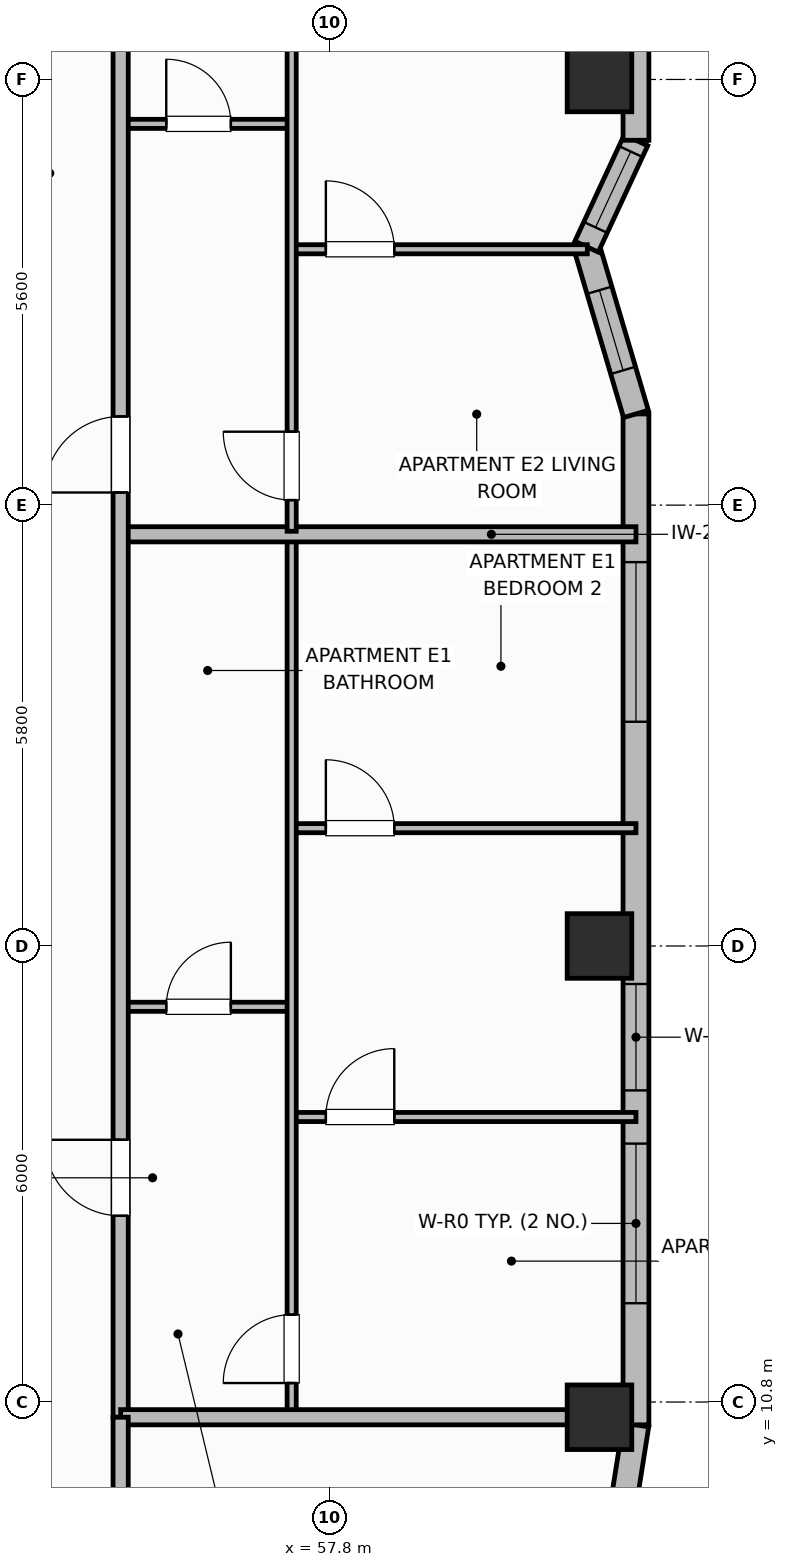
"""IFC4 building model, lengths in metres.
Left out: names, types, materials, properties, quantities, classifications, styles, units other than length and angle.
Written with IfcOpenShell. Run it as: python <this file> out.ifc"""

import sys

from ifc_helpers import new_model, si_unit, direction, frame, frame_2d, origin, origin_2d, place, context, subcontext, project, spatial, rectangle, extrude, element, fill, save


model = new_model("IFC4")
c1 = context("Model", 3, precision=1e-05, world=origin(), true_north=direction((0.0, 1.0)))
c2 = subcontext(c1, "Body", "Model", "MODEL_VIEW")
j1 = project(units=[si_unit("LENGTHUNIT", "METRE"), si_unit("PLANEANGLEUNIT", "RADIAN")], contexts=[c1])
p1 = place(None, origin())
s1 = spatial("IfcSite", under=j1, at=p1, CompositionType="ELEMENT")
p2 = place(p1, origin())
s2 = spatial("IfcBuilding", under=s1, at=p2, CompositionType="ELEMENT")
p3 = place(p2, frame((0.0, 0.0, 214.7)))
s3 = spatial("IfcBuildingStorey", under=s2, at=p3, CompositionType="ELEMENT", Elevation=214.7)
for number, where, z_axis, x_axis in (
    (1, (61.35, 10.6, 0.0), (0.0, 0.0, 1.0), (1.0, 0.0, 0.0)),
    (2, (61.35, 16.8, 0.0), (0.0, 0.0, 1.0), (1.0, 0.0, 0.0)),
    (3, (61.35, 28.2, 0.0), (0.0, 0.0, 1.0), (1.0, 0.0, 0.0)),
):
    element("IfcColumn", number, at=place(p3, frame(where, z_axis=z_axis, x_axis=x_axis)), inside=s3, PredefinedType="COLUMN", context=c2, shape_type="SweptSolid", body=[
        extrude(rectangle(XDim=0.85, YDim=0.85, at=origin_2d()), origin(), (0.0, 0.0, 1.0), 3.7),
    ])
p4 = place(p3, frame((61.652, 9.378, 0.0), z_axis=(0.0, 0.0, 1.0), x_axis=(0.156514556949, 0.987675651954, 0.0)))
e4 = element("IfcWall", 4, at=p4, inside=s3, PredefinedType="SOLIDWALL", context=c2, shape_type="SweptSolid", body=[
    extrude(rectangle(XDim=1.135, YDim=0.34, at=frame_2d((0.568, 0.0))), origin(), (0.0, 0.0, 1.0), 2.72),
])
p5 = place(p3, frame((61.83, 10.5, 0.0), z_axis=(0.0, 0.0, 1.0), x_axis=(0.0, 1.0, 0.0)))
e5 = element("IfcWall", 5, at=p5, inside=s3, PredefinedType="SOLIDWALL", context=c2, shape_type="SweptSolid", body=[
    extrude(rectangle(XDim=13.3, YDim=0.34, at=frame_2d((6.65, 0.0))), origin(), (0.0, 0.0, 1.0), 2.72),
])
p6 = place(p5, frame((1.6, 0.0, 0.7)))
e6 = element("IfcOpeningElement", 6, at=p6, cuts=e5, PredefinedType="OPENING", context=c2, shape_type="SweptSolid", body=[
    extrude(rectangle(XDim=2.1, YDim=1.9, at=frame_2d((1.05, 0.95))), frame((0.0, 0.18, 0.0), z_axis=(0.0, -1.0, 0.0), x_axis=(1.0, 0.0, 0.0)), (0.0, 0.0, 1.0), 0.36),
])
p7 = place(p5, frame((4.4, 0.0, 0.71)))
e7 = element("IfcOpeningElement", 7, at=p7, cuts=e5, PredefinedType="OPENING", context=c2, shape_type="SweptSolid", body=[
    extrude(rectangle(XDim=1.4, YDim=1.85, at=frame_2d((0.7, 0.925))), frame((0.0, 0.18, 0.0), z_axis=(0.0, -1.0, 0.0), x_axis=(1.0, 0.0, 0.0)), (0.0, 0.0, 1.0), 0.36),
])
p8 = place(p5, frame((9.25, 0.0, 0.7)))
e8 = element("IfcOpeningElement", 8, at=p8, cuts=e5, PredefinedType="OPENING", context=c2, shape_type="SweptSolid", body=[
    extrude(rectangle(XDim=2.1, YDim=1.9, at=frame_2d((1.05, 0.95))), frame((0.0, 0.18, 0.0), z_axis=(0.0, -1.0, 0.0), x_axis=(1.0, 0.0, 0.0)), (0.0, 0.0, 1.0), 0.36),
])
p9 = place(p3, frame((61.83, 23.8, 0.0), z_axis=(0.0, 0.0, 1.0), x_axis=(-0.283410652833, 0.958998645391, 0.0)))
e9 = element("IfcWall", 9, at=p9, inside=s3, PredefinedType="SOLIDWALL", context=c2, shape_type="SweptSolid", body=[
    extrude(rectangle(XDim=2.294, YDim=0.34, at=frame_2d((1.147, 0.0))), origin(), (0.0, 0.0, 1.0), 2.72),
])
p10 = place(p9, frame((0.597, 0.0, 0.91)))
e10 = element("IfcOpeningElement", 10, at=p10, cuts=e9, PredefinedType="OPENING", context=c2, shape_type="SweptSolid", body=[
    extrude(rectangle(XDim=1.1, YDim=1.65, at=frame_2d((0.55, 0.825))), frame((0.0, 0.18, 0.0), z_axis=(0.0, -1.0, 0.0), x_axis=(1.0, 0.0, 0.0)), (0.0, 0.0, 1.0), 0.36),
])
p11 = place(p3, frame((61.18, 26.0, 0.0), z_axis=(0.0, 0.0, 1.0), x_axis=(0.421213543339, 0.906961493619, 0.0)))
e11 = element("IfcWall", 11, at=p11, inside=s3, PredefinedType="SOLIDWALL", context=c2, shape_type="SweptSolid", body=[
    extrude(rectangle(XDim=1.543, YDim=0.34, at=frame_2d((0.772, 0.0))), origin(), (0.0, 0.0, 1.0), 2.72),
])
p12 = place(p11, frame((0.28, 0.0, 0.91)))
e12 = element("IfcOpeningElement", 12, at=p12, cuts=e11, PredefinedType="OPENING", context=c2, shape_type="SweptSolid", body=[
    extrude(rectangle(XDim=1.1, YDim=1.65, at=frame_2d((0.55, 0.825))), frame((0.0, 0.18, 0.0), z_axis=(0.0, -1.0, 0.0), x_axis=(1.0, 0.0, 0.0)), (0.0, 0.0, 1.0), 0.36),
])
p13 = place(p3, frame((61.83, 27.4, 0.0), z_axis=(0.0, 0.0, 1.0), x_axis=(0.0, 1.0, 0.0)))
e13 = element("IfcWall", 13, at=p13, inside=s3, PredefinedType="SOLIDWALL", context=c2, shape_type="SweptSolid", body=[
    extrude(rectangle(XDim=1.6, YDim=0.34, at=frame_2d((0.8, 0.0))), origin(), (0.0, 0.0, 1.0), 2.72),
])
p14 = place(p3, frame((55.05, 16.0, 0.0), z_axis=(0.0, 0.0, 1.0), x_axis=(1.0, 0.0, 0.0)))
e14 = element("IfcWall", 14, at=p14, inside=s3, PredefinedType="PARTITIONING", context=c2, shape_type="SweptSolid", body=[
    extrude(rectangle(XDim=2.25, YDim=0.12, at=frame_2d((1.125, 0.0))), origin(), (0.0, 0.0, 1.0), 2.55),
])
p15 = place(p14, frame((0.6, 0.0, 0.0)))
e15 = element("IfcOpeningElement", 15, at=p15, cuts=e14, PredefinedType="OPENING", context=c2, shape_type="SweptSolid", body=[
    extrude(rectangle(XDim=0.85, YDim=2.1, at=frame_2d((0.425, 1.05))), frame((0.0, 0.07, 0.0), z_axis=(0.0, -1.0, 0.0), x_axis=(1.0, 0.0, 0.0)), (0.0, 0.0, 1.0), 0.14),
])
p16 = place(p3, frame((57.3, 14.55, 0.0), z_axis=(0.0, 0.0, 1.0), x_axis=(1.0, 0.0, 0.0)))
e16 = element("IfcWall", 16, at=p16, inside=s3, PredefinedType="PARTITIONING", context=c2, shape_type="SweptSolid", body=[
    extrude(rectangle(XDim=4.53, YDim=0.12, at=frame_2d((2.265, 0.0))), origin(), (0.0, 0.0, 1.0), 2.55),
])
p17 = place(p16, frame((0.45, 0.0, 0.0)))
e17 = element("IfcOpeningElement", 17, at=p17, cuts=e16, PredefinedType="OPENING", context=c2, shape_type="SweptSolid", body=[
    extrude(rectangle(XDim=0.9, YDim=2.1, at=frame_2d((0.45, 1.05))), frame((0.0, 0.07, 0.0), z_axis=(0.0, -1.0, 0.0), x_axis=(1.0, 0.0, 0.0)), (0.0, 0.0, 1.0), 0.14),
])
p18 = place(p3, frame((57.3, 18.35, 0.0), z_axis=(0.0, 0.0, 1.0), x_axis=(1.0, 0.0, 0.0)))
e18 = element("IfcWall", 18, at=p18, inside=s3, PredefinedType="PARTITIONING", context=c2, shape_type="SweptSolid", body=[
    extrude(rectangle(XDim=4.53, YDim=0.12, at=frame_2d((2.265, 0.0))), origin(), (0.0, 0.0, 1.0), 2.55),
])
p19 = place(p18, frame((0.45, 0.0, 0.0)))
e19 = element("IfcOpeningElement", 19, at=p19, cuts=e18, PredefinedType="OPENING", context=c2, shape_type="SweptSolid", body=[
    extrude(rectangle(XDim=0.9, YDim=2.1, at=frame_2d((0.45, 1.05))), frame((0.0, 0.07, 0.0), z_axis=(0.0, -1.0, 0.0), x_axis=(1.0, 0.0, 0.0)), (0.0, 0.0, 1.0), 0.14),
])
p20 = place(p3, frame((57.3, 10.64, 0.0), z_axis=(0.0, 0.0, 1.0), x_axis=(0.0, 1.0, 0.0)))
e20 = element("IfcWall", 20, at=p20, inside=s3, PredefinedType="PARTITIONING", context=c2, shape_type="SweptSolid", body=[
    extrude(rectangle(XDim=11.536, YDim=0.12, at=frame_2d((5.768, 0.0))), origin(), (0.0, 0.0, 1.0), 2.55),
])
p21 = place(p20, frame((0.41, 0.0, 0.0)))
e21 = element("IfcOpeningElement", 21, at=p21, cuts=e20, PredefinedType="OPENING", context=c2, shape_type="SweptSolid", body=[
    extrude(rectangle(XDim=0.9, YDim=2.1, at=frame_2d((0.45, 1.05))), frame((0.0, 0.07, 0.0), z_axis=(0.0, -1.0, 0.0), x_axis=(1.0, 0.0, 0.0)), (0.0, 0.0, 1.0), 0.14),
])
p22 = place(p3, frame((55.05, 22.216, 0.0), z_axis=(0.0, 0.0, 1.0), x_axis=(1.0, 0.0, 0.0)))
e22 = element("IfcWall", 22, at=p22, inside=s3, PredefinedType="PARTITIONING", context=c2, shape_type="SweptSolid", body=[
    extrude(rectangle(XDim=6.78, YDim=0.2, at=frame_2d((3.39, 0.0))), origin(), (0.0, 0.0, 1.0), 2.55),
])
p23 = place(p3, frame((55.05, 27.616, 0.0), z_axis=(0.0, 0.0, 1.0), x_axis=(1.0, 0.0, 0.0)))
e23 = element("IfcWall", 23, at=p23, inside=s3, PredefinedType="PARTITIONING", context=c2, shape_type="SweptSolid", body=[
    extrude(rectangle(XDim=2.25, YDim=0.12, at=frame_2d((1.125, 0.0))), origin(), (0.0, 0.0, 1.0), 2.55),
])
p24 = place(p23, frame((0.6, 0.0, 0.0)))
e24 = element("IfcOpeningElement", 24, at=p24, cuts=e23, PredefinedType="OPENING", context=c2, shape_type="SweptSolid", body=[
    extrude(rectangle(XDim=0.85, YDim=2.1, at=frame_2d((0.425, 1.05))), frame((0.0, 0.07, 0.0), z_axis=(0.0, -1.0, 0.0), x_axis=(1.0, 0.0, 0.0)), (0.0, 0.0, 1.0), 0.14),
])
p25 = place(p3, frame((57.3, 25.966, 0.0), z_axis=(0.0, 0.0, 1.0), x_axis=(1.0, 0.0, 0.0)))
e25 = element("IfcWall", 25, at=p25, inside=s3, PredefinedType="PARTITIONING", context=c2, shape_type="SweptSolid", body=[
    extrude(rectangle(XDim=3.89, YDim=0.12, at=frame_2d((1.945, 0.0))), origin(), (0.0, 0.0, 1.0), 2.55),
])
p26 = place(p25, frame((0.45, 0.0, 0.0)))
e26 = element("IfcOpeningElement", 26, at=p26, cuts=e25, PredefinedType="OPENING", context=c2, shape_type="SweptSolid", body=[
    extrude(rectangle(XDim=0.9, YDim=2.1, at=frame_2d((0.45, 1.05))), frame((0.0, 0.07, 0.0), z_axis=(0.0, -1.0, 0.0), x_axis=(1.0, 0.0, 0.0)), (0.0, 0.0, 1.0), 0.14),
])
p27 = place(p3, frame((57.3, 22.256, 0.0), z_axis=(0.0, 0.0, 1.0), x_axis=(0.0, 1.0, 0.0)))
e27 = element("IfcWall", 27, at=p27, inside=s3, PredefinedType="PARTITIONING", context=c2, shape_type="SweptSolid", body=[
    extrude(rectangle(XDim=11.404, YDim=0.12, at=frame_2d((5.702, 0.0))), origin(), (0.0, 0.0, 1.0), 2.55),
])
p28 = place(p27, frame((0.41, 0.0, 0.0)))
e28 = element("IfcOpeningElement", 28, at=p28, cuts=e27, PredefinedType="OPENING", context=c2, shape_type="SweptSolid", body=[
    extrude(rectangle(XDim=0.9, YDim=2.1, at=frame_2d((0.45, 1.05))), frame((0.0, 0.07, 0.0), z_axis=(0.0, -1.0, 0.0), x_axis=(1.0, 0.0, 0.0)), (0.0, 0.0, 1.0), 0.14),
])
p29 = place(p3, frame((55.05, 10.6, 0.0), z_axis=(0.0, 0.0, 1.0), x_axis=(0.0, 1.0, 0.0)))
e29 = element("IfcWall", 29, at=p29, inside=s3, PredefinedType="PARTITIONING", context=c2, shape_type="SweptSolid", body=[
    extrude(rectangle(XDim=35.2, YDim=0.2, at=frame_2d((17.6, 0.0))), origin(), (0.0, 0.0, 1.0), 2.55),
])
p30 = place(p29, frame((2.65, 0.0, 0.0)))
e30 = element("IfcOpeningElement", 30, at=p30, cuts=e29, PredefinedType="OPENING", context=c2, shape_type="SweptSolid", body=[
    extrude(rectangle(XDim=1.0, YDim=2.15, at=frame_2d((0.5, 1.075))), frame((0.0, 0.11, 0.0), z_axis=(0.0, -1.0, 0.0), x_axis=(1.0, 0.0, 0.0)), (0.0, 0.0, 1.0), 0.22),
])
p31 = place(p29, frame((12.166, 0.0, 0.0)))
e31 = element("IfcOpeningElement", 31, at=p31, cuts=e29, PredefinedType="OPENING", context=c2, shape_type="SweptSolid", body=[
    extrude(rectangle(XDim=1.0, YDim=2.15, at=frame_2d((0.5, 1.075))), frame((0.0, 0.11, 0.0), z_axis=(0.0, -1.0, 0.0), x_axis=(1.0, 0.0, 0.0)), (0.0, 0.0, 1.0), 0.22),
])
p32 = place(p29, frame((23.65, 0.0, 0.0)))
e32 = element("IfcOpeningElement", 32, at=p32, cuts=e29, PredefinedType="OPENING", context=c2, shape_type="SweptSolid", body=[
    extrude(rectangle(XDim=1.0, YDim=2.15, at=frame_2d((0.5, 1.075))), frame((0.0, 0.11, 0.0), z_axis=(0.0, -1.0, 0.0), x_axis=(1.0, 0.0, 0.0)), (0.0, 0.0, 1.0), 0.22),
])
p33 = place(p3, frame((55.05, 10.6, 0.0), z_axis=(0.0, 0.0, 1.0), x_axis=(1.0, 0.0, 0.0)))
e33 = element("IfcWall", 33, at=p33, inside=s3, PredefinedType="PARTITIONING", context=c2, shape_type="SweptSolid", body=[
    extrude(rectangle(XDim=6.36, YDim=0.2, at=frame_2d((3.18, 0.0))), origin(), (0.0, 0.0, 1.0), 2.55),
])
p34 = place(p3, frame((55.05, 6.87, 0.0), z_axis=(0.0, 0.0, 1.0), x_axis=(0.0, 1.0, 0.0)))
e34 = element("IfcWall", 34, at=p34, inside=s3, PredefinedType="PARTITIONING", context=c2, shape_type="SweptSolid", body=[
    extrude(rectangle(XDim=3.73, YDim=0.2, at=frame_2d((1.865, 0.0))), origin(), (0.0, 0.0, 1.0), 2.55),
])
p35 = place(p6, origin())
e35 = element("IfcWindow", 35, at=p35, inside=s3, PartitioningType="SINGLE_PANEL", PredefinedType="WINDOW", context=c2, shape_type="SweptSolid", body=[
    extrude(rectangle(XDim=2.1, YDim=1.9, at=frame_2d((1.05, 0.95))), frame((0.0, 0.03, 0.0), z_axis=(0.0, -1.0, 0.0), x_axis=(1.0, 0.0, 0.0)), (0.0, 0.0, 1.0), 0.06),
])
fill(e6, e35)
p36 = place(p7, origin())
e36 = element("IfcWindow", 36, at=p36, inside=s3, PartitioningType="SINGLE_PANEL", PredefinedType="WINDOW", context=c2, shape_type="SweptSolid", body=[
    extrude(rectangle(XDim=1.4, YDim=1.85, at=frame_2d((0.7, 0.925))), frame((0.0, 0.03, 0.0), z_axis=(0.0, -1.0, 0.0), x_axis=(1.0, 0.0, 0.0)), (0.0, 0.0, 1.0), 0.06),
])
fill(e7, e36)
p37 = place(p8, origin())
e37 = element("IfcWindow", 37, at=p37, inside=s3, PartitioningType="SINGLE_PANEL", PredefinedType="WINDOW", context=c2, shape_type="SweptSolid", body=[
    extrude(rectangle(XDim=2.1, YDim=1.9, at=frame_2d((1.05, 0.95))), frame((0.0, 0.03, 0.0), z_axis=(0.0, -1.0, 0.0), x_axis=(1.0, 0.0, 0.0)), (0.0, 0.0, 1.0), 0.06),
])
fill(e8, e37)
p38 = place(p10, origin())
e38 = element("IfcWindow", 38, at=p38, inside=s3, PartitioningType="SINGLE_PANEL", PredefinedType="WINDOW", context=c2, shape_type="SweptSolid", body=[
    extrude(rectangle(XDim=1.1, YDim=1.65, at=frame_2d((0.55, 0.825))), frame((0.0, 0.03, 0.0), z_axis=(0.0, -1.0, 0.0), x_axis=(1.0, 0.0, 0.0)), (0.0, 0.0, 1.0), 0.06),
])
fill(e10, e38)
p39 = place(p12, origin())
e39 = element("IfcWindow", 39, at=p39, inside=s3, PartitioningType="SINGLE_PANEL", PredefinedType="WINDOW", context=c2, shape_type="SweptSolid", body=[
    extrude(rectangle(XDim=1.1, YDim=1.65, at=frame_2d((0.55, 0.825))), frame((0.0, 0.03, 0.0), z_axis=(0.0, -1.0, 0.0), x_axis=(1.0, 0.0, 0.0)), (0.0, 0.0, 1.0), 0.06),
])
fill(e12, e39)
p40 = place(p15, origin())
e40 = element("IfcDoor", 40, at=p40, inside=s3, OperationType="SINGLE_SWING_RIGHT", PredefinedType="DOOR", context=c2, shape_type="SweptSolid", body=[
    extrude(rectangle(XDim=0.85, YDim=2.1, at=frame_2d((0.425, 1.05))), frame((0.0, 0.025, 0.0), z_axis=(0.0, -1.0, 0.0), x_axis=(1.0, 0.0, 0.0)), (0.0, 0.0, 1.0), 0.05),
])
fill(e15, e40)
p41 = place(p17, origin())
e41 = element("IfcDoor", 41, at=p41, inside=s3, OperationType="SINGLE_SWING_RIGHT", PredefinedType="DOOR", context=c2, shape_type="SweptSolid", body=[
    extrude(rectangle(XDim=0.9, YDim=2.1, at=frame_2d((0.45, 1.05))), frame((0.0, 0.025, 0.0), z_axis=(0.0, -1.0, 0.0), x_axis=(1.0, 0.0, 0.0)), (0.0, 0.0, 1.0), 0.05),
])
fill(e17, e41)
p42 = place(p19, origin())
e42 = element("IfcDoor", 42, at=p42, inside=s3, OperationType="SINGLE_SWING_LEFT", PredefinedType="DOOR", context=c2, shape_type="SweptSolid", body=[
    extrude(rectangle(XDim=0.9, YDim=2.1, at=frame_2d((0.45, 1.05))), frame((0.0, 0.025, 0.0), z_axis=(0.0, -1.0, 0.0), x_axis=(1.0, 0.0, 0.0)), (0.0, 0.0, 1.0), 0.05),
])
fill(e19, e42)
p43 = place(p21, origin())
e43 = element("IfcDoor", 43, at=p43, inside=s3, OperationType="SINGLE_SWING_LEFT", PredefinedType="DOOR", context=c2, shape_type="SweptSolid", body=[
    extrude(rectangle(XDim=0.9, YDim=2.1, at=frame_2d((0.45, 1.05))), frame((0.0, 0.025, 0.0), z_axis=(0.0, -1.0, 0.0), x_axis=(1.0, 0.0, 0.0)), (0.0, 0.0, 1.0), 0.05),
])
fill(e21, e43)
p44 = place(p24, origin())
e44 = element("IfcDoor", 44, at=p44, inside=s3, OperationType="SINGLE_SWING_LEFT", PredefinedType="DOOR", context=c2, shape_type="SweptSolid", body=[
    extrude(rectangle(XDim=0.85, YDim=2.1, at=frame_2d((0.425, 1.05))), frame((0.0, 0.025, 0.0), z_axis=(0.0, -1.0, 0.0), x_axis=(1.0, 0.0, 0.0)), (0.0, 0.0, 1.0), 0.05),
])
fill(e24, e44)
p45 = place(p26, origin())
e45 = element("IfcDoor", 45, at=p45, inside=s3, OperationType="SINGLE_SWING_LEFT", PredefinedType="DOOR", context=c2, shape_type="SweptSolid", body=[
    extrude(rectangle(XDim=0.9, YDim=2.1, at=frame_2d((0.45, 1.05))), frame((0.0, 0.025, 0.0), z_axis=(0.0, -1.0, 0.0), x_axis=(1.0, 0.0, 0.0)), (0.0, 0.0, 1.0), 0.05),
])
fill(e26, e45)
p46 = place(p28, origin())
e46 = element("IfcDoor", 46, at=p46, inside=s3, OperationType="SINGLE_SWING_RIGHT", PredefinedType="DOOR", context=c2, shape_type="SweptSolid", body=[
    extrude(rectangle(XDim=0.9, YDim=2.1, at=frame_2d((0.45, 1.05))), frame((0.0, 0.025, 0.0), z_axis=(0.0, -1.0, 0.0), x_axis=(1.0, 0.0, 0.0)), (0.0, 0.0, 1.0), 0.05),
])
fill(e28, e46)
p47 = place(p30, origin())
e47 = element("IfcDoor", 47, at=p47, inside=s3, OperationType="SINGLE_SWING_RIGHT", PredefinedType="DOOR", context=c2, shape_type="SweptSolid", body=[
    extrude(rectangle(XDim=1.0, YDim=2.15, at=frame_2d((0.5, 1.075))), frame((0.0, 0.025, 0.0), z_axis=(0.0, -1.0, 0.0), x_axis=(1.0, 0.0, 0.0)), (0.0, 0.0, 1.0), 0.05),
])
fill(e30, e47)
p48 = place(p31, origin())
e48 = element("IfcDoor", 48, at=p48, inside=s3, OperationType="SINGLE_SWING_LEFT", PredefinedType="DOOR", context=c2, shape_type="SweptSolid", body=[
    extrude(rectangle(XDim=1.0, YDim=2.15, at=frame_2d((0.5, 1.075))), frame((0.0, 0.025, 0.0), z_axis=(0.0, -1.0, 0.0), x_axis=(1.0, 0.0, 0.0)), (0.0, 0.0, 1.0), 0.05),
])
fill(e31, e48)
save(model, sys.argv[1])
